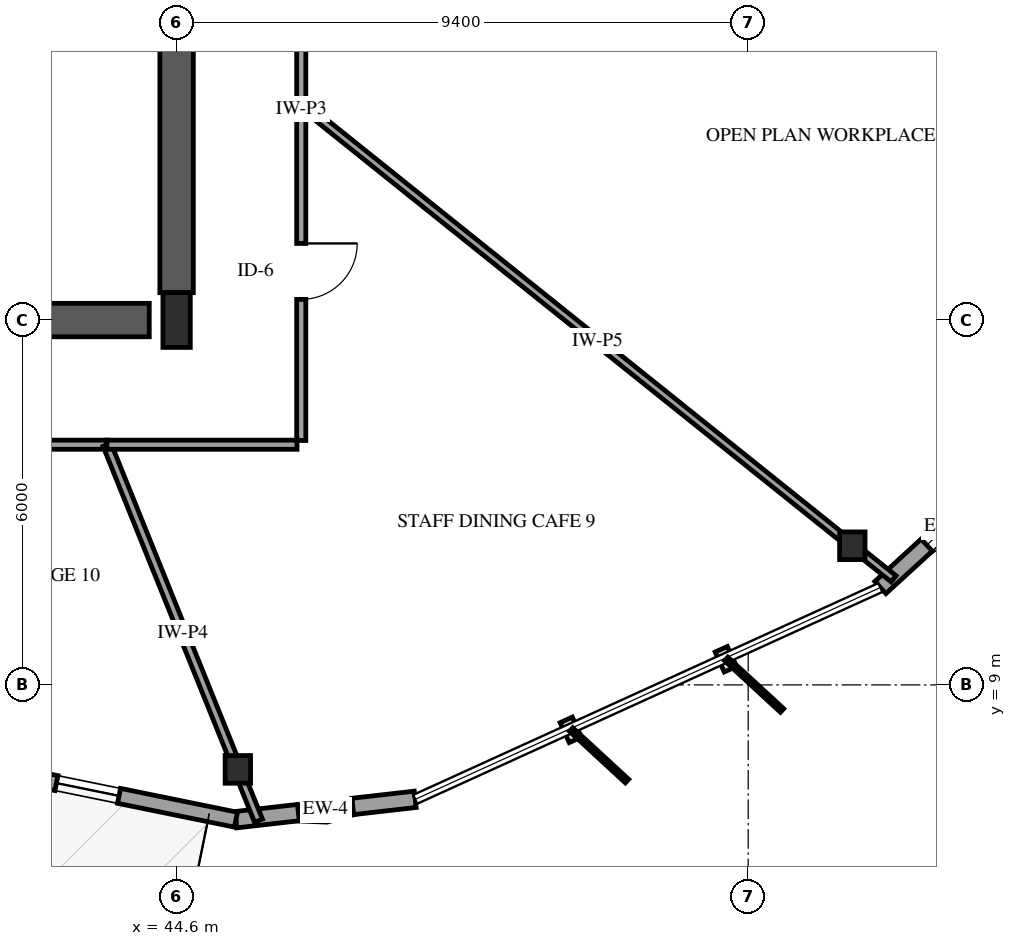
"""IFC4 building model, lengths in metres.
Left out: names, types, materials, properties, quantities, classifications, styles, units other than length and angle.
Written with IfcOpenShell. Run it as: python <this file> out.ifc"""

import sys

from ifc_helpers import new_model, si_unit, direction, frame, frame_2d, origin, origin_2d, place, context, subcontext, project, spatial, rectangle, i_section, extrude, element, fill, save


model = new_model("IFC4")
c1 = context("Model", 3, precision=1e-05, world=origin(), true_north=direction((0.0, 1.0)))
c2 = subcontext(c1, "Body", "Model", "MODEL_VIEW")
j1 = project(units=[si_unit("LENGTHUNIT", "METRE"), si_unit("PLANEANGLEUNIT", "RADIAN")], contexts=[c1])
p1 = place(None, origin())
s1 = spatial("IfcSite", under=j1, at=p1, CompositionType="ELEMENT")
p2 = place(p1, origin())
s2 = spatial("IfcBuilding", under=s1, at=p2, CompositionType="ELEMENT")
p3 = place(p2, frame((0.0, 0.0, 122.5)))
s3 = spatial("IfcBuildingStorey", under=s2, at=p3, CompositionType="ELEMENT", Elevation=122.5)
p4 = place(p3, frame((41.3, 15.0, 0.0), z_axis=(0.0, 0.0, 1.0), x_axis=(1.0, 0.0, 0.0)))
e1 = element("IfcWall", 1, at=p4, inside=s3, PredefinedType="SHEAR", context=c2, shape_type="SweptSolid", body=[
    extrude(rectangle(XDim=2.85, YDim=0.55, at=frame_2d((1.425, 0.0))), origin(), (0.0, 0.0, 1.0), 3.9),
])
p5 = place(p3, frame((44.6, 15.45, 0.0), z_axis=(0.0, 0.0, 1.0), x_axis=(0.0, 1.0, 0.0)))
e2 = element("IfcWall", 2, at=p5, inside=s3, PredefinedType="SHEAR", context=c2, shape_type="SweptSolid", body=[
    extrude(rectangle(XDim=6.35, YDim=0.55, at=frame_2d((3.175, 0.0))), origin(), (0.0, 0.0, 1.0), 3.9),
])
p6 = place(p3, frame((44.6, 15.0, 0.0), z_axis=(0.0, 0.0, 1.0), x_axis=(1.0, 0.0, 0.0)))
e3 = element("IfcColumn", 3, at=p6, inside=s3, PredefinedType="PILASTER", context=c2, shape_type="SweptSolid", body=[
    extrude(rectangle(XDim=0.45, YDim=0.9, at=origin_2d()), origin(), (0.0, 0.0, 1.0), 3.9),
])
for number, where, z_axis, x_axis in (
    (4, (45.607, 7.611, 0.0), (0.0, 0.0, 1.0), (1.0, 0.0, 0.0)),
    (5, (55.712, 11.289, 0.0), (0.0, 0.0, 1.0), (1.0, 0.0, 0.0)),
):
    element("IfcColumn", number, at=place(p3, frame(where, z_axis=z_axis, x_axis=x_axis)), inside=s3, PredefinedType="COLUMN", context=c2, shape_type="SweptSolid", body=[
        extrude(i_section(OverallWidth=0.418, OverallDepth=0.455, WebThickness=0.042, FlangeThickness=0.068, FilletRadius=0.038, at=origin_2d()), origin(), (0.0, 0.0, 1.0), 3.9),
    ])
p7 = place(p3, frame((45.576, 6.783, 0.0), z_axis=(0.0, 0.0, 1.0), x_axis=(0.993605674431, 0.11290599514, 0.0)))
e6 = element("IfcWall", 6, at=p7, inside=s3, PredefinedType="SOLIDWALL", context=c2, shape_type="SweptSolid", body=[
    extrude(rectangle(XDim=2.967, YDim=0.27, at=frame_2d((1.483, 0.0))), origin(), (0.0, 0.0, 1.0), 2.979),
])
p8 = place(p7, frame((1.033, 0.0, 0.75)))
e7 = element("IfcOpeningElement", 7, at=p8, cuts=e6, PredefinedType="OPENING", context=c2, shape_type="SweptSolid", body=[
    extrude(rectangle(XDim=0.9, YDim=1.5, at=frame_2d((0.45, 0.75))), frame((0.0, 0.145, 0.0), z_axis=(0.0, -1.0, 0.0), x_axis=(1.0, 0.0, 0.0)), (0.0, 0.0, 1.0), 0.29),
])
p9 = place(p3, frame((37.34, 8.462, 0.0), z_axis=(0.0, 0.0, 1.0), x_axis=(0.979852344118, -0.199723267865, 0.0)))
e8 = element("IfcWall", 8, at=p9, inside=s3, PredefinedType="SOLIDWALL", context=c2, shape_type="SweptSolid", body=[
    extrude(rectangle(XDim=8.405, YDim=0.25, at=frame_2d((4.203, 0.0))), origin(), (0.0, 0.0, 1.0), 2.979),
])
p10 = place(p9, frame((3.703, 0.0, 0.0)))
e9 = element("IfcOpeningElement", 9, at=p10, cuts=e8, PredefinedType="OPENING", context=c2, shape_type="SweptSolid", body=[
    extrude(rectangle(XDim=1.05, YDim=2.15, at=frame_2d((0.525, 1.075))), frame((0.0, 0.135, 0.0), z_axis=(0.0, -1.0, 0.0), x_axis=(1.0, 0.0, 0.0)), (0.0, 0.0, 1.0), 0.27),
])
p11 = place(p9, frame((0.44, 0.0, 0.72)))
e10 = element("IfcOpeningElement", 10, at=p11, cuts=e8, PredefinedType="OPENING", context=c2, shape_type="SweptSolid", body=[
    extrude(rectangle(XDim=1.05, YDim=1.55, at=frame_2d((0.525, 0.775))), frame((0.0, 0.135, 0.0), z_axis=(0.0, -1.0, 0.0), x_axis=(1.0, 0.0, 0.0)), (0.0, 0.0, 1.0), 0.27),
])
p12 = place(p9, frame((5.393, 0.0, 0.72)))
e11 = element("IfcOpeningElement", 11, at=p12, cuts=e8, PredefinedType="OPENING", context=c2, shape_type="SweptSolid", body=[
    extrude(rectangle(XDim=1.05, YDim=1.55, at=frame_2d((0.525, 0.775))), frame((0.0, 0.135, 0.0), z_axis=(0.0, -1.0, 0.0), x_axis=(1.0, 0.0, 0.0)), (0.0, 0.0, 1.0), 0.27),
])
p13 = place(p3, frame((56.174, 10.601, 0.0), z_axis=(0.0, 0.0, 1.0), x_axis=(0.737529789318, 0.675314600663, 0.0)))
e12 = element("IfcWall", 12, at=p13, inside=s3, PredefinedType="SOLIDWALL", context=c2, shape_type="SweptSolid", body=[
    extrude(rectangle(XDim=2.967, YDim=0.27, at=frame_2d((1.483, 0.0))), origin(), (0.0, 0.0, 1.0), 2.979),
])
p14 = place(p13, frame((1.033, 0.0, 0.75)))
e13 = element("IfcOpeningElement", 13, at=p14, cuts=e12, PredefinedType="OPENING", context=c2, shape_type="SweptSolid", body=[
    extrude(rectangle(XDim=0.9, YDim=1.5, at=frame_2d((0.45, 0.75))), frame((0.0, 0.145, 0.0), z_axis=(0.0, -1.0, 0.0), x_axis=(1.0, 0.0, 0.0)), (0.0, 0.0, 1.0), 0.29),
])
p15 = place(p3, frame((46.65, 18.55, 0.0), z_axis=(0.0, 0.0, 1.0), x_axis=(0.780401084776, -0.625279255118, 0.0)))
e14 = element("IfcWall", 14, at=p15, inside=s3, PredefinedType="PARTITIONING", context=c2, shape_type="SweptSolid", body=[
    extrude(rectangle(XDim=12.482, YDim=0.13, at=frame_2d((6.241, 0.0))), origin(), (0.0, 0.0, 1.0), 3.6),
])
p16 = place(p3, frame((43.455, 12.95, 0.0), z_axis=(0.0, 0.0, 1.0), x_axis=(-1.0, 0.0, 0.0)))
e15 = element("IfcWall", 15, at=p16, inside=s3, PredefinedType="PARTITIONING", context=c2, shape_type="SweptSolid", body=[
    extrude(rectangle(XDim=7.637, YDim=0.15, at=frame_2d((3.818, 0.0))), origin(), (0.0, 0.0, 1.0), 3.6),
])
p17 = place(p16, frame((3.344, 0.0, 0.0)))
e16 = element("IfcOpeningElement", 16, at=p17, cuts=e15, PredefinedType="OPENING", context=c2, shape_type="SweptSolid", body=[
    extrude(rectangle(XDim=0.92, YDim=2.12, at=frame_2d((0.46, 1.06))), frame((0.0, 0.085, 0.0), z_axis=(0.0, -1.0, 0.0), x_axis=(1.0, 0.0, 0.0)), (0.0, 0.0, 1.0), 0.17),
])
p18 = place(p3, frame((43.455, 12.95, 0.0), z_axis=(0.0, 0.0, 1.0), x_axis=(0.373820474629, -0.927501079648, 0.0)))
e17 = element("IfcWall", 17, at=p18, inside=s3, PredefinedType="PARTITIONING", context=c2, shape_type="SweptSolid", body=[
    extrude(rectangle(XDim=6.666, YDim=0.14, at=frame_2d((3.333, 0.0))), origin(), (0.0, 0.0, 1.0), 2.895),
])
p19 = place(p3, frame((46.65, 18.55, 0.0), z_axis=(0.0, 0.0, 1.0), x_axis=(0.0, -1.0, 0.0)))
e18 = element("IfcWall", 18, at=p19, inside=s3, PredefinedType="PARTITIONING", context=c2, shape_type="SweptSolid", body=[
    extrude(rectangle(XDim=5.53, YDim=0.15, at=frame_2d((2.765, 0.0))), origin(), (0.0, 0.0, 1.0), 3.6),
])
p20 = place(p19, frame((2.29, 0.0, 0.0)))
e19 = element("IfcOpeningElement", 19, at=p20, cuts=e18, PredefinedType="OPENING", context=c2, shape_type="SweptSolid", body=[
    extrude(rectangle(XDim=0.92, YDim=2.12, at=frame_2d((0.46, 1.06))), frame((0.0, 0.085, 0.0), z_axis=(0.0, -1.0, 0.0), x_axis=(1.0, 0.0, 0.0)), (0.0, 0.0, 1.0), 0.17),
])
p21 = place(p3, frame((46.65, 23.93, 0.0), z_axis=(0.0, 0.0, 1.0), x_axis=(0.0, -1.0, 0.0)))
e20 = element("IfcWall", 20, at=p21, inside=s3, PredefinedType="PARTITIONING", context=c2, shape_type="SweptSolid", body=[
    extrude(rectangle(XDim=5.38, YDim=0.15, at=frame_2d((2.69, 0.0))), origin(), (0.0, 0.0, 1.0), 3.6),
])
p22 = place(p3, frame((46.58, 12.95, 0.0), z_axis=(0.0, 0.0, 1.0), x_axis=(-1.0, 0.0, 0.0)))
e21 = element("IfcWall", 21, at=p22, inside=s3, PredefinedType="PARTITIONING", context=c2, shape_type="SweptSolid", body=[
    extrude(rectangle(XDim=3.125, YDim=0.15, at=frame_2d((1.562, 0.0))), origin(), (0.0, 0.0, 1.0), 3.6),
])
p23 = place(p8, origin())
e22 = element("IfcWindow", 22, at=p23, inside=s3, PartitioningType="SINGLE_PANEL", PredefinedType="WINDOW", context=c2, shape_type="SweptSolid", body=[
    extrude(rectangle(XDim=0.9, YDim=1.5, at=frame_2d((0.45, 0.75))), frame((0.0, 0.03, 0.0), z_axis=(0.0, -1.0, 0.0), x_axis=(1.0, 0.0, 0.0)), (0.0, 0.0, 1.0), 0.06),
])
fill(e7, e22)
p24 = place(p12, origin())
e23 = element("IfcWindow", 23, at=p24, inside=s3, PartitioningType="SINGLE_PANEL", PredefinedType="WINDOW", context=c2, shape_type="SweptSolid", body=[
    extrude(rectangle(XDim=1.05, YDim=1.55, at=frame_2d((0.525, 0.775))), frame((0.0, 0.03, 0.0), z_axis=(0.0, -1.0, 0.0), x_axis=(1.0, 0.0, 0.0)), (0.0, 0.0, 1.0), 0.06),
])
fill(e11, e23)
p25 = place(p14, origin())
e24 = element("IfcWindow", 24, at=p25, inside=s3, PartitioningType="SINGLE_PANEL", PredefinedType="WINDOW", context=c2, shape_type="SweptSolid", body=[
    extrude(rectangle(XDim=0.9, YDim=1.5, at=frame_2d((0.45, 0.75))), frame((0.0, 0.03, 0.0), z_axis=(0.0, -1.0, 0.0), x_axis=(1.0, 0.0, 0.0)), (0.0, 0.0, 1.0), 0.06),
])
fill(e13, e24)
p26 = place(p20, origin())
e25 = element("IfcDoor", 25, at=p26, inside=s3, OperationType="SINGLE_SWING_LEFT", PredefinedType="DOOR", context=c2, shape_type="SweptSolid", body=[
    extrude(rectangle(XDim=0.92, YDim=2.12, at=frame_2d((0.46, 1.06))), frame((0.0, 0.025, 0.0), z_axis=(0.0, -1.0, 0.0), x_axis=(1.0, 0.0, 0.0)), (0.0, 0.0, 1.0), 0.05),
])
fill(e19, e25)
save(model, sys.argv[1])
